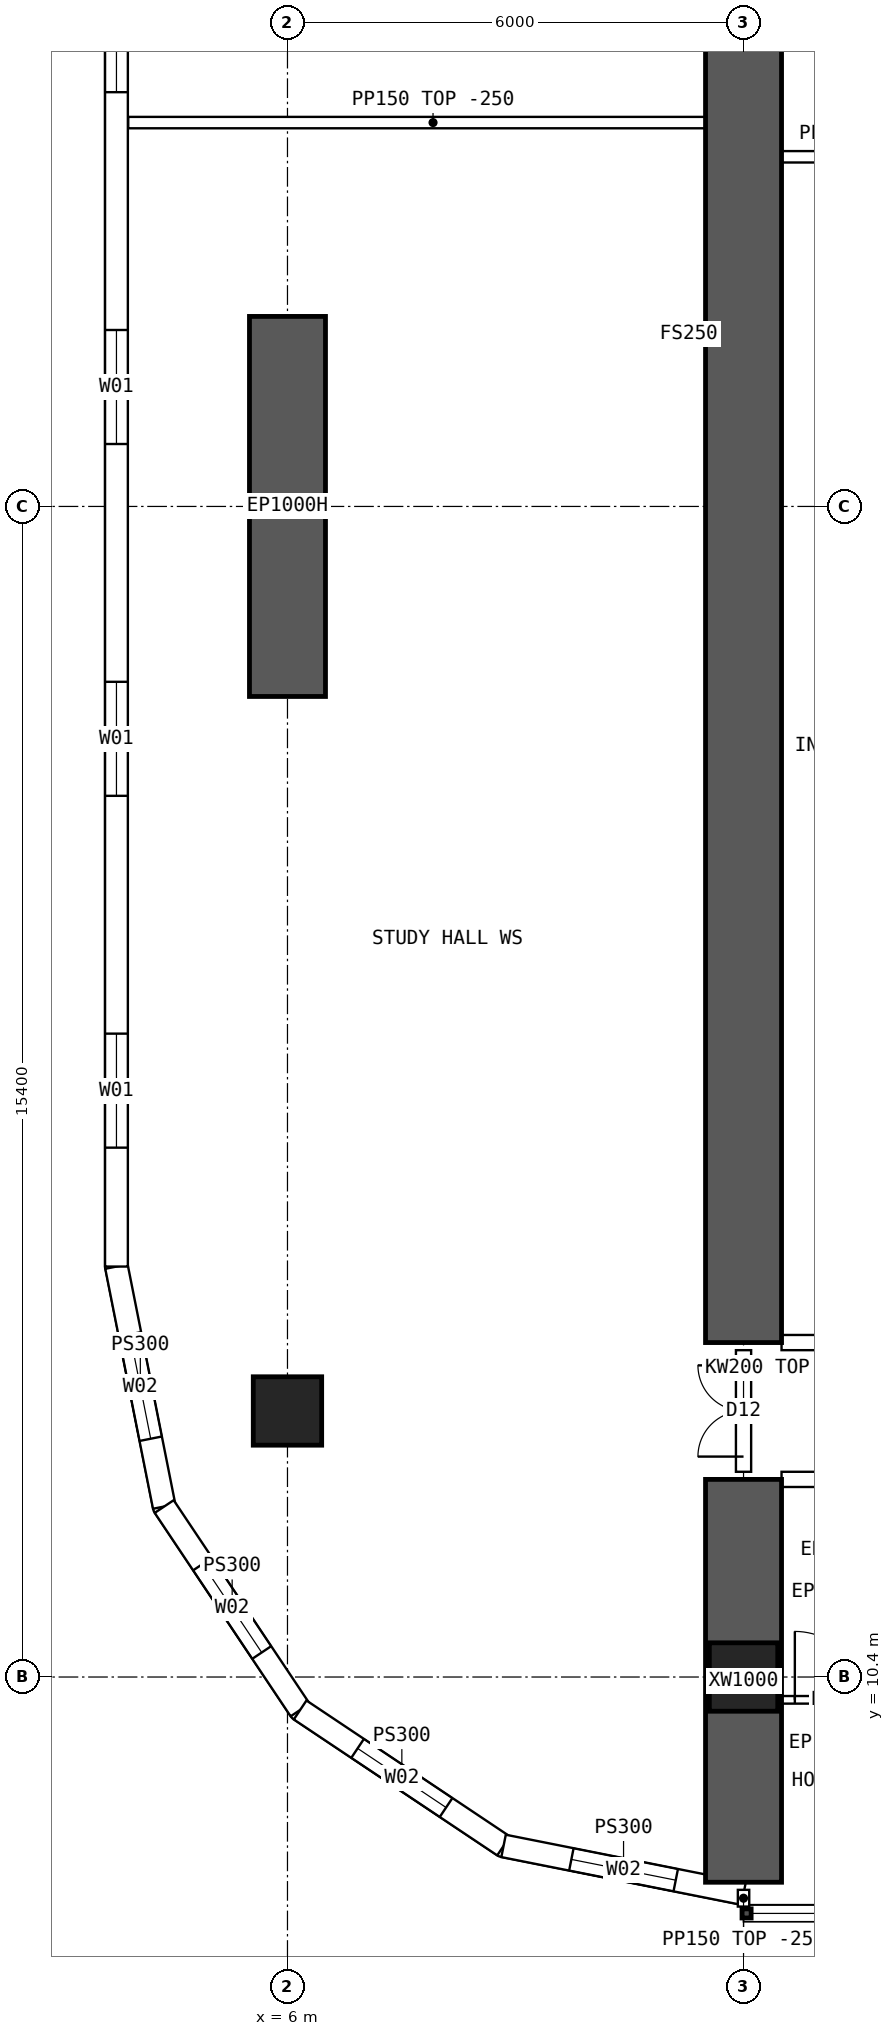
"""IFC4 building model, lengths in metres.
Left out: names, types, materials, properties, quantities, classifications, styles, units other than length and angle.
Written with IfcOpenShell. Run it as: python <this file> out.ifc"""

import sys

from ifc_helpers import new_model, si_unit, direction, frame, frame_2d, origin, origin_2d, place, context, subcontext, project, spatial, polyline, rectangle, hollow_rectangle, outline, extrude, element, fill, save


model = new_model("IFC4")
c1 = context("Model", 3, precision=1e-05, world=origin(), true_north=direction((0.0, 1.0)))
c2 = subcontext(c1, "Body", "Model", "MODEL_VIEW")
j1 = project(units=[si_unit("LENGTHUNIT", "METRE"), si_unit("PLANEANGLEUNIT", "RADIAN")], contexts=[c1])
p1 = place(None, origin())
s1 = spatial("IfcSite", under=j1, at=p1, CompositionType="ELEMENT")
p2 = place(p1, origin())
s2 = spatial("IfcBuilding", under=s1, at=p2, CompositionType="ELEMENT")
p3 = place(p2, frame((0.0, 0.0, 46.45)))
s3 = spatial("IfcBuildingStorey", under=s2, at=p3, CompositionType="ELEMENT", Elevation=46.45)
for number, where, z_axis, x_axis in (
    (1, (12.0, 10.4, 0.0), (0.0, 0.0, 1.0), (1.0, 0.0, 0.0)),
    (2, (6.0, 13.9, 0.0), (0.0, 0.0, 1.0), (1.0, 0.0, 0.0)),
):
    element("IfcColumn", number, at=place(p3, frame(where, z_axis=z_axis, x_axis=x_axis)), inside=s3, PredefinedType="COLUMN", context=c2, shape_type="SweptSolid", body=[
        extrude(hollow_rectangle(XDim=0.9, YDim=0.9, WallThickness=0.09, at=origin_2d()), origin(), (0.0, 0.0, 1.0), 3.75),
    ])
p4 = place(p3, frame((6.0, 23.3, 0.0), z_axis=(0.0, 0.0, 1.0), x_axis=(0.0, 1.0, 0.0)))
e3 = element("IfcWall", 3, at=p4, inside=s3, PredefinedType="SHEAR", context=c2, shape_type="SweptSolid", body=[
    extrude(rectangle(XDim=5.0, YDim=1.0, at=frame_2d((2.5, 0.0))), origin(), (0.0, 0.0, 1.0), 3.75),
])
p5 = place(p3, frame((12.0, 7.7, 0.0), z_axis=(0.0, 0.0, 1.0), x_axis=(0.0, 1.0, 0.0)))
e4 = element("IfcWall", 4, at=p5, inside=s3, PredefinedType="SHEAR", context=c2, shape_type="SweptSolid", body=[
    extrude(rectangle(XDim=5.3, YDim=1.0, at=frame_2d((2.65, 0.0))), origin(), (0.0, 0.0, 1.0), 3.75),
])
p6 = place(p3, frame((12.0, 14.8, 0.0), z_axis=(0.0, 0.0, 1.0), x_axis=(0.0, 1.0, 0.0)))
e5 = element("IfcWall", 5, at=p6, inside=s3, PredefinedType="SHEAR", context=c2, shape_type="SweptSolid", body=[
    extrude(rectangle(XDim=34.4, YDim=1.0, at=frame_2d((17.2, 0.0))), origin(), (0.0, 0.0, 1.0), 3.75),
])
p7 = place(p3, frame((3.75, 48.2, 0.0), z_axis=(0.0, 0.0, 1.0), x_axis=(0.0, -1.0, 0.0)))
e6 = element("IfcWall", 6, at=p7, inside=s3, PredefinedType="SOLIDWALL", context=c2, shape_type="SweptSolid", body=[
    extrude(outline(polyline([(-0.015, -0.15), (32.415, -0.15), (32.385, 0.15), (0.015, 0.15), (-0.015, -0.15)])), origin(), (0.0, 0.0, 1.0), 3.5),
])
p8 = place(p7, frame((1.564, 0.0, 0.9)))
e7 = element("IfcOpeningElement", 7, at=p8, cuts=e6, PredefinedType="OPENING", context=c2, shape_type="SweptSolid", body=[
    extrude(rectangle(XDim=1.5, YDim=2.0, at=frame_2d((0.75, 1.0))), frame((0.0, 0.16, 0.0), z_axis=(0.0, -1.0, 0.0), x_axis=(1.0, 0.0, 0.0)), (0.0, 0.0, 1.0), 0.32),
])
p9 = place(p7, frame((6.193, 0.0, 0.9)))
e8 = element("IfcOpeningElement", 8, at=p9, cuts=e6, PredefinedType="OPENING", context=c2, shape_type="SweptSolid", body=[
    extrude(rectangle(XDim=1.5, YDim=2.0, at=frame_2d((0.75, 1.0))), frame((0.0, 0.16, 0.0), z_axis=(0.0, -1.0, 0.0), x_axis=(1.0, 0.0, 0.0)), (0.0, 0.0, 1.0), 0.32),
])
p10 = place(p7, frame((10.822, 0.0, 0.9)))
e9 = element("IfcOpeningElement", 9, at=p10, cuts=e6, PredefinedType="OPENING", context=c2, shape_type="SweptSolid", body=[
    extrude(rectangle(XDim=1.5, YDim=2.0, at=frame_2d((0.75, 1.0))), frame((0.0, 0.16, 0.0), z_axis=(0.0, -1.0, 0.0), x_axis=(1.0, 0.0, 0.0)), (0.0, 0.0, 1.0), 0.32),
])
p11 = place(p7, frame((15.45, 0.0, 0.9)))
e10 = element("IfcOpeningElement", 10, at=p11, cuts=e6, PredefinedType="OPENING", context=c2, shape_type="SweptSolid", body=[
    extrude(rectangle(XDim=1.5, YDim=2.0, at=frame_2d((0.75, 1.0))), frame((0.0, 0.16, 0.0), z_axis=(0.0, -1.0, 0.0), x_axis=(1.0, 0.0, 0.0)), (0.0, 0.0, 1.0), 0.32),
])
p12 = place(p7, frame((20.079, 0.0, 0.9)))
e11 = element("IfcOpeningElement", 11, at=p12, cuts=e6, PredefinedType="OPENING", context=c2, shape_type="SweptSolid", body=[
    extrude(rectangle(XDim=1.5, YDim=2.0, at=frame_2d((0.75, 1.0))), frame((0.0, 0.16, 0.0), z_axis=(0.0, -1.0, 0.0), x_axis=(1.0, 0.0, 0.0)), (0.0, 0.0, 1.0), 0.32),
])
p13 = place(p7, frame((24.707, 0.0, 0.9)))
e12 = element("IfcOpeningElement", 12, at=p13, cuts=e6, PredefinedType="OPENING", context=c2, shape_type="SweptSolid", body=[
    extrude(rectangle(XDim=1.5, YDim=2.0, at=frame_2d((0.75, 1.0))), frame((0.0, 0.16, 0.0), z_axis=(0.0, -1.0, 0.0), x_axis=(1.0, 0.0, 0.0)), (0.0, 0.0, 1.0), 0.32),
])
p14 = place(p7, frame((29.336, 0.0, 0.9)))
e13 = element("IfcOpeningElement", 13, at=p14, cuts=e6, PredefinedType="OPENING", context=c2, shape_type="SweptSolid", body=[
    extrude(rectangle(XDim=1.5, YDim=2.0, at=frame_2d((0.75, 1.0))), frame((0.0, 0.16, 0.0), z_axis=(0.0, -1.0, 0.0), x_axis=(1.0, 0.0, 0.0)), (0.0, 0.0, 1.0), 0.32),
])
p15 = place(p3, frame((3.75, 15.8, 0.0), z_axis=(0.0, 0.0, 1.0), x_axis=(0.195065901187, -0.980790137692, 0.0)))
e14 = element("IfcWall", 14, at=p15, inside=s3, PredefinedType="SOLIDWALL", context=c2, shape_type="SweptSolid", body=[
    extrude(outline(polyline([(-0.015, -0.15), (3.249, -0.15), (3.189, 0.15), (0.015, 0.15), (-0.015, -0.15)])), origin(), (0.0, 0.0, 1.0), 3.5),
])
p16 = place(p15, frame((0.909, 0.0, 0.9)))
e15 = element("IfcOpeningElement", 15, at=p16, cuts=e14, PredefinedType="OPENING", context=c2, shape_type="SweptSolid", body=[
    extrude(rectangle(XDim=1.4, YDim=1.8, at=frame_2d((0.7, 0.9))), frame((0.0, 0.16, 0.0), z_axis=(0.0, -1.0, 0.0), x_axis=(1.0, 0.0, 0.0)), (0.0, 0.0, 1.0), 0.32),
])
p17 = place(p3, frame((4.378, 12.643, 0.0), z_axis=(0.0, 0.0, 1.0), x_axis=(0.555609954424, -0.831443069936, 0.0)))
e16 = element("IfcWall", 16, at=p17, inside=s3, PredefinedType="SOLIDWALL", context=c2, shape_type="SweptSolid", body=[
    extrude(outline(polyline([(-0.03, -0.15), (3.249, -0.15), (3.189, 0.15), (0.03, 0.15), (-0.03, -0.15)])), origin(), (0.0, 0.0, 1.0), 3.5),
])
p18 = place(p17, frame((0.909, 0.0, 0.9)))
e17 = element("IfcOpeningElement", 17, at=p18, cuts=e16, PredefinedType="OPENING", context=c2, shape_type="SweptSolid", body=[
    extrude(rectangle(XDim=1.4, YDim=1.8, at=frame_2d((0.7, 0.9))), frame((0.0, 0.16, 0.0), z_axis=(0.0, -1.0, 0.0), x_axis=(1.0, 0.0, 0.0)), (0.0, 0.0, 1.0), 0.32),
])
p19 = place(p3, frame((6.167, 9.966, 0.0), z_axis=(0.0, 0.0, 1.0), x_axis=(0.831478105043, -0.555557522525, 0.0)))
e18 = element("IfcWall", 18, at=p19, inside=s3, PredefinedType="SOLIDWALL", context=c2, shape_type="SweptSolid", body=[
    extrude(outline(polyline([(-0.03, -0.15), (3.249, -0.15), (3.189, 0.15), (0.03, 0.15), (-0.03, -0.15)])), origin(), (0.0, 0.0, 1.0), 3.5),
])
p20 = place(p19, frame((0.909, 0.0, 0.9)))
e19 = element("IfcOpeningElement", 19, at=p20, cuts=e18, PredefinedType="OPENING", context=c2, shape_type="SweptSolid", body=[
    extrude(rectangle(XDim=1.4, YDim=1.8, at=frame_2d((0.7, 0.9))), frame((0.0, 0.16, 0.0), z_axis=(0.0, -1.0, 0.0), x_axis=(1.0, 0.0, 0.0)), (0.0, 0.0, 1.0), 0.32),
])
p21 = place(p3, frame((8.843, 8.178, 0.0), z_axis=(0.0, 0.0, 1.0), x_axis=(0.980787251524, -0.195080412259, 0.0)))
e20 = element("IfcWall", 20, at=p21, inside=s3, PredefinedType="SOLIDWALL", context=c2, shape_type="SweptSolid", body=[
    extrude(outline(polyline([(-0.03, -0.15), (3.249, -0.15), (3.189, 0.15), (0.03, 0.15), (-0.03, -0.15)])), origin(), (0.0, 0.0, 1.0), 3.5),
])
p22 = place(p21, frame((0.909, 0.0, 0.9)))
e21 = element("IfcOpeningElement", 21, at=p22, cuts=e20, PredefinedType="OPENING", context=c2, shape_type="SweptSolid", body=[
    extrude(rectangle(XDim=1.4, YDim=1.8, at=frame_2d((0.7, 0.9))), frame((0.0, 0.16, 0.0), z_axis=(0.0, -1.0, 0.0), x_axis=(1.0, 0.0, 0.0)), (0.0, 0.0, 1.0), 0.32),
])
p23 = place(p3, frame((12.5, 13.0, 0.0), z_axis=(0.0, 0.0, 1.0), x_axis=(1.0, 0.0, 0.0)))
e22 = element("IfcWall", 22, at=p23, inside=s3, PredefinedType="SOLIDWALL", context=c2, shape_type="SweptSolid", body=[
    extrude(outline(polyline([(0.0, 0.0), (5.0, 0.0), (5.0, 3.1), (0.0, 3.1), (0.0, 0.0)])), frame((0.0, 0.1, 0.0), z_axis=(0.0, -1.0, 0.0), x_axis=(1.0, 0.0, 0.0)), (0.0, 0.0, 1.0), 0.2),
])
p24 = place(p23, frame((1.3, 0.0, 0.0)))
e23 = element("IfcOpeningElement", 23, at=p24, cuts=e22, PredefinedType="OPENING", context=c2, shape_type="SweptSolid", body=[
    extrude(rectangle(XDim=0.9, YDim=2.1, at=frame_2d((0.45, 1.05))), frame((0.0, 0.11, 0.0), z_axis=(0.0, -1.0, 0.0), x_axis=(1.0, 0.0, 0.0)), (0.0, 0.0, 1.0), 0.22),
])
p25 = place(p23, frame((2.675, 0.0, 0.0)))
e24 = element("IfcOpeningElement", 24, at=p25, cuts=e22, PredefinedType="OPENING", context=c2, shape_type="SweptSolid", body=[
    extrude(rectangle(XDim=0.9, YDim=2.1, at=frame_2d((0.45, 1.05))), frame((0.0, 0.11, 0.0), z_axis=(0.0, -1.0, 0.0), x_axis=(1.0, 0.0, 0.0)), (0.0, 0.0, 1.0), 0.22),
])
p26 = place(p3, frame((12.5, 14.8, 0.0), z_axis=(0.0, 0.0, 1.0), x_axis=(1.0, 0.0, 0.0)))
e25 = element("IfcWall", 25, at=p26, inside=s3, PredefinedType="SOLIDWALL", context=c2, shape_type="SweptSolid", body=[
    extrude(rectangle(XDim=5.0, YDim=0.2, at=frame_2d((2.5, 0.0))), origin(), (0.0, 0.0, 1.0), 3.5),
])
p27 = place(p26, frame((3.3, 0.0, 0.0)))
e26 = element("IfcOpeningElement", 26, at=p27, cuts=e25, PredefinedType="OPENING", context=c2, shape_type="SweptSolid", body=[
    extrude(rectangle(XDim=1.6, YDim=2.1, at=frame_2d((0.8, 1.05))), frame((0.0, 0.11, 0.0), z_axis=(0.0, -1.0, 0.0), x_axis=(1.0, 0.0, 0.0)), (0.0, 0.0, 1.0), 0.22),
])
p28 = place(p3, frame((13.75, 10.1, 0.0), z_axis=(0.0, 0.0, 1.0), x_axis=(-1.0, 0.0, 0.0)))
e27 = element("IfcWall", 27, at=p28, inside=s3, PredefinedType="PARTITIONING", context=c2, shape_type="SweptSolid", body=[
    extrude(rectangle(XDim=1.3, YDim=0.1, at=frame_2d((0.65, 0.0))), origin(), (0.0, 0.0, 1.0), 3.5),
])
p29 = place(p28, frame((0.175, 0.0, 0.0)))
e28 = element("IfcOpeningElement", 28, at=p29, cuts=e27, PredefinedType="OPENING", context=c2, shape_type="SweptSolid", body=[
    extrude(rectangle(XDim=0.9, YDim=2.1, at=frame_2d((0.45, 1.05))), frame((0.0, 0.06, 0.0), z_axis=(0.0, -1.0, 0.0), x_axis=(1.0, 0.0, 0.0)), (0.0, 0.0, 1.0), 0.12),
])
p30 = place(p3, frame((12.0, 30.4, 0.0), z_axis=(0.0, 0.0, 1.0), x_axis=(1.0, 0.0, 0.0)))
e29 = element("IfcWall", 29, at=p30, inside=s3, PredefinedType="PARTITIONING", context=c2, shape_type="SweptSolid", body=[
    extrude(rectangle(XDim=3.6, YDim=0.15, at=frame_2d((1.8, 0.0))), origin(), (0.0, 0.0, 1.0), 3.5),
])
p31 = place(p3, frame((3.905, 30.85, 0.0), z_axis=(0.0, 0.0, 1.0), x_axis=(1.0, 0.0, 0.0)))
e30 = element("IfcWall", 30, at=p31, inside=s3, PredefinedType="PARTITIONING", context=c2, shape_type="SweptSolid", body=[
    extrude(outline(polyline([(0.0, 0.0), (8.02, 0.0), (8.02, 3.5), (2.397, 3.5), (2.395, 3.05), (1.797, 3.05), (1.795, 3.5), (0.0, 3.5), (0.0, 0.0)])), frame((0.0, 0.075, 0.0), z_axis=(0.0, -1.0, 0.0), x_axis=(1.0, 0.0, 0.0)), (0.0, 0.0, 1.0), 0.15),
])
p32 = place(p3, frame((12.0, 13.1, 0.0), z_axis=(0.0, 0.0, 1.0), x_axis=(0.0, 1.0, 0.0)))
e31 = element("IfcWall", 31, at=p32, inside=s3, PredefinedType="SOLIDWALL", context=c2, shape_type="SweptSolid", body=[
    extrude(outline(polyline([(0.0, 0.0), (1.6, 0.0), (1.6, 3.05), (0.0, 3.05), (0.0, 0.0)])), frame((0.0, 0.1, 0.0), z_axis=(0.0, -1.0, 0.0), x_axis=(1.0, 0.0, 0.0)), (0.0, 0.0, 1.0), 0.2),
])
p33 = place(p32, frame((0.2, 0.0, 0.0)))
e32 = element("IfcOpeningElement", 32, at=p33, cuts=e31, PredefinedType="OPENING", context=c2, shape_type="SweptSolid", body=[
    extrude(rectangle(XDim=1.2, YDim=2.1, at=frame_2d((0.6, 1.05))), frame((0.0, 0.11, 0.0), z_axis=(0.0, -1.0, 0.0), x_axis=(1.0, 0.0, 0.0)), (0.0, 0.0, 1.0), 0.22),
])
p34 = place(p3, frame((12.0, 7.6, 0.0), z_axis=(0.0, 0.0, 1.0), x_axis=(0.0, -1.0, 0.0)))
e33 = element("IfcWall", 33, at=p34, inside=s3, PredefinedType="PARTITIONING", context=c2, shape_type="SweptSolid", body=[
    extrude(rectangle(XDim=0.22, YDim=0.15, at=frame_2d((0.11, 0.0))), origin(), (0.0, 0.0, 1.0), 3.5),
])
p35 = place(p11, origin())
e34 = element("IfcWindow", 34, at=p35, inside=s3, PartitioningType="SINGLE_PANEL", PredefinedType="WINDOW", context=c2, shape_type="SweptSolid", body=[
    extrude(rectangle(XDim=1.5, YDim=2.0, at=frame_2d((0.75, 1.0))), frame((0.0, 0.03, 0.0), z_axis=(0.0, -1.0, 0.0), x_axis=(1.0, 0.0, 0.0)), (0.0, 0.0, 1.0), 0.06),
])
fill(e10, e34)
p36 = place(p12, origin())
e35 = element("IfcWindow", 35, at=p36, inside=s3, PartitioningType="SINGLE_PANEL", PredefinedType="WINDOW", context=c2, shape_type="SweptSolid", body=[
    extrude(rectangle(XDim=1.5, YDim=2.0, at=frame_2d((0.75, 1.0))), frame((0.0, 0.03, 0.0), z_axis=(0.0, -1.0, 0.0), x_axis=(1.0, 0.0, 0.0)), (0.0, 0.0, 1.0), 0.06),
])
fill(e11, e35)
p37 = place(p13, origin())
e36 = element("IfcWindow", 36, at=p37, inside=s3, PartitioningType="SINGLE_PANEL", PredefinedType="WINDOW", context=c2, shape_type="SweptSolid", body=[
    extrude(rectangle(XDim=1.5, YDim=2.0, at=frame_2d((0.75, 1.0))), frame((0.0, 0.03, 0.0), z_axis=(0.0, -1.0, 0.0), x_axis=(1.0, 0.0, 0.0)), (0.0, 0.0, 1.0), 0.06),
])
fill(e12, e36)
p38 = place(p14, origin())
e37 = element("IfcWindow", 37, at=p38, inside=s3, PartitioningType="SINGLE_PANEL", PredefinedType="WINDOW", context=c2, shape_type="SweptSolid", body=[
    extrude(rectangle(XDim=1.5, YDim=2.0, at=frame_2d((0.75, 1.0))), frame((0.0, 0.03, 0.0), z_axis=(0.0, -1.0, 0.0), x_axis=(1.0, 0.0, 0.0)), (0.0, 0.0, 1.0), 0.06),
])
fill(e13, e37)
p39 = place(p16, origin())
e38 = element("IfcWindow", 38, at=p39, inside=s3, PartitioningType="SINGLE_PANEL", PredefinedType="WINDOW", context=c2, shape_type="SweptSolid", body=[
    extrude(rectangle(XDim=1.4, YDim=1.8, at=frame_2d((0.7, 0.9))), frame((0.0, 0.03, 0.0), z_axis=(0.0, -1.0, 0.0), x_axis=(1.0, 0.0, 0.0)), (0.0, 0.0, 1.0), 0.06),
])
fill(e15, e38)
p40 = place(p18, origin())
e39 = element("IfcWindow", 39, at=p40, inside=s3, PartitioningType="SINGLE_PANEL", PredefinedType="WINDOW", context=c2, shape_type="SweptSolid", body=[
    extrude(rectangle(XDim=1.4, YDim=1.8, at=frame_2d((0.7, 0.9))), frame((0.0, 0.03, 0.0), z_axis=(0.0, -1.0, 0.0), x_axis=(1.0, 0.0, 0.0)), (0.0, 0.0, 1.0), 0.06),
])
fill(e17, e39)
p41 = place(p20, origin())
e40 = element("IfcWindow", 40, at=p41, inside=s3, PartitioningType="SINGLE_PANEL", PredefinedType="WINDOW", context=c2, shape_type="SweptSolid", body=[
    extrude(rectangle(XDim=1.4, YDim=1.8, at=frame_2d((0.7, 0.9))), frame((0.0, 0.03, 0.0), z_axis=(0.0, -1.0, 0.0), x_axis=(1.0, 0.0, 0.0)), (0.0, 0.0, 1.0), 0.06),
])
fill(e19, e40)
p42 = place(p22, origin())
e41 = element("IfcWindow", 41, at=p42, inside=s3, PartitioningType="SINGLE_PANEL", PredefinedType="WINDOW", context=c2, shape_type="SweptSolid", body=[
    extrude(rectangle(XDim=1.4, YDim=1.8, at=frame_2d((0.7, 0.9))), frame((0.0, 0.03, 0.0), z_axis=(0.0, -1.0, 0.0), x_axis=(1.0, 0.0, 0.0)), (0.0, 0.0, 1.0), 0.06),
])
fill(e21, e41)
p43 = place(p29, origin())
e42 = element("IfcDoor", 42, at=p43, inside=s3, OperationType="SINGLE_SWING_RIGHT", PredefinedType="DOOR", context=c2, shape_type="SweptSolid", body=[
    extrude(rectangle(XDim=0.9, YDim=2.1, at=frame_2d((0.45, 1.05))), frame((0.0, 0.025, 0.0), z_axis=(0.0, -1.0, 0.0), x_axis=(1.0, 0.0, 0.0)), (0.0, 0.0, 1.0), 0.05),
])
fill(e28, e42)
p44 = place(p33, origin())
e43 = element("IfcDoor", 43, at=p44, inside=s3, OperationType="DOUBLE_DOOR_SINGLE_SWING", PredefinedType="DOOR", context=c2, shape_type="SweptSolid", body=[
    extrude(rectangle(XDim=1.2, YDim=2.1, at=frame_2d((0.6, 1.05))), frame((0.0, 0.025, 0.0), z_axis=(0.0, -1.0, 0.0), x_axis=(1.0, 0.0, 0.0)), (0.0, 0.0, 1.0), 0.05),
])
fill(e32, e43)
save(model, sys.argv[1])
